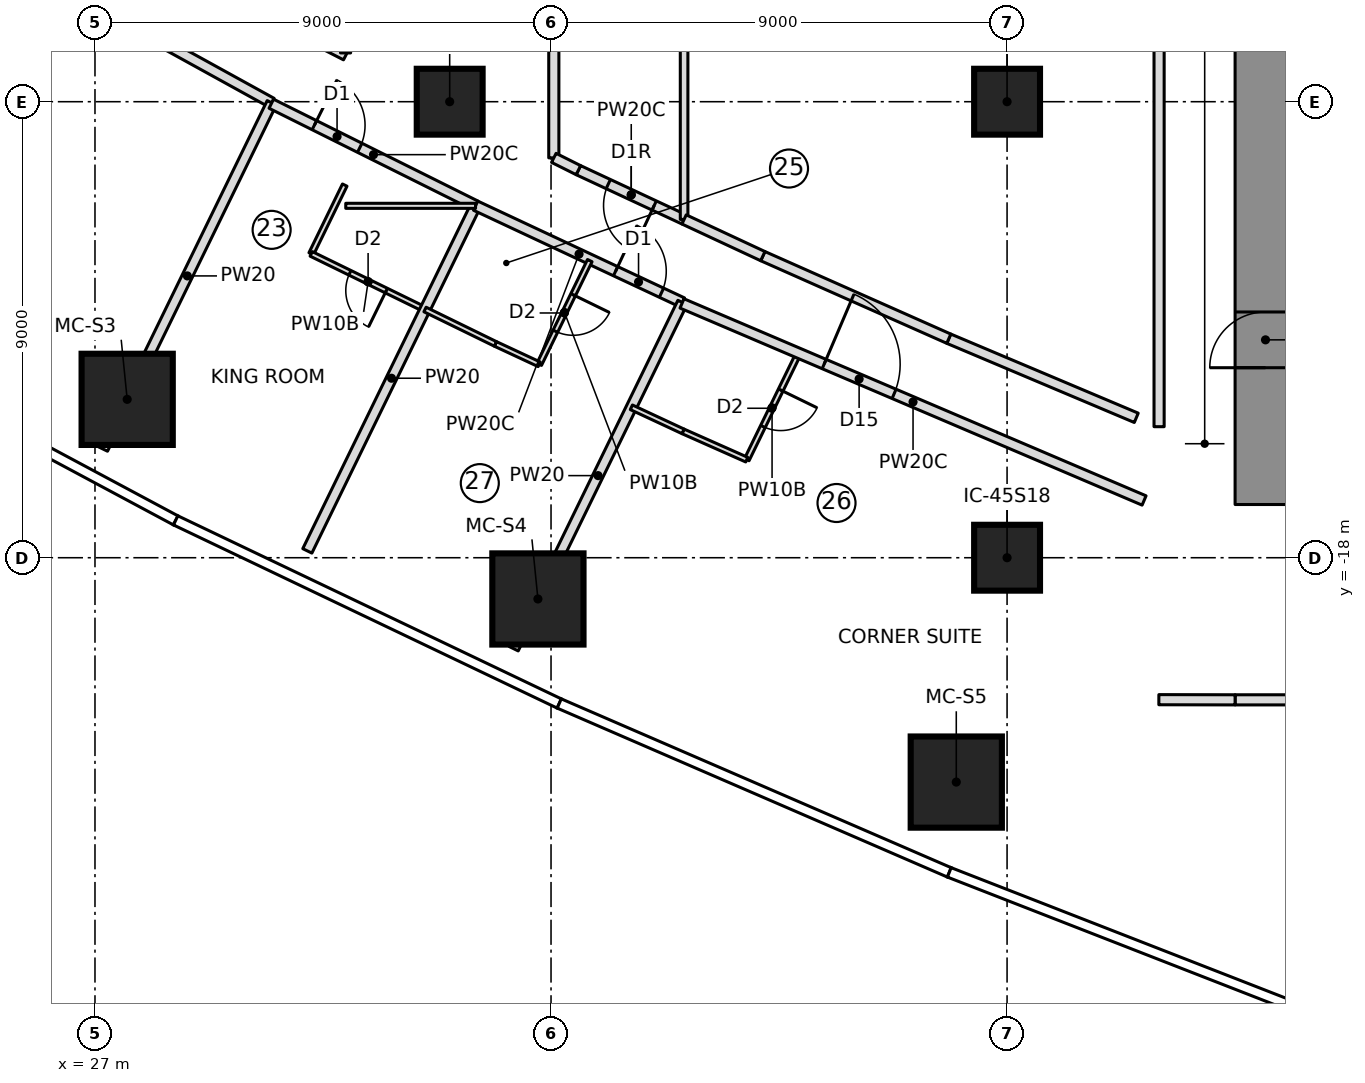
"""IFC4 building model, lengths in metres.
Left out: names, types, materials, properties, quantities, classifications, styles, units other than length and angle.
Written with IfcOpenShell. Run it as: python <this file> out.ifc"""

import sys

from ifc_helpers import new_model, si_unit, direction, frame, frame_2d, origin, origin_2d, place, context, subcontext, project, spatial, rectangle, extrude, element, fill, save


model = new_model("IFC4")
c1 = context("Model", 3, precision=1e-05, world=origin(), true_north=direction((0.0, 1.0)))
c2 = subcontext(c1, "Body", "Model", "MODEL_VIEW")
j1 = project(units=[si_unit("LENGTHUNIT", "METRE"), si_unit("PLANEANGLEUNIT", "RADIAN")], contexts=[c1])
p1 = place(None, origin())
s1 = spatial("IfcSite", under=j1, at=p1, CompositionType="ELEMENT")
p2 = place(p1, origin())
s2 = spatial("IfcBuilding", under=s1, at=p2, CompositionType="ELEMENT")
p3 = place(p2, frame((0.0, 0.0, 39.6)))
s3 = spatial("IfcBuildingStorey", under=s2, at=p3, CompositionType="ELEMENT", Elevation=39.6)
p4 = place(p3, frame((50.1, -16.95, 0.0), z_axis=(0.0, 0.0, 1.0), x_axis=(0.0, 1.0, 0.0)))
e1 = element("IfcWall", 1, at=p4, inside=s3, PredefinedType="SHEAR", context=c2, shape_type="SweptSolid", body=[
    extrude(rectangle(XDim=10.3, YDim=1.2, at=frame_2d((5.15, 0.0))), origin(), (0.0, 0.0, 1.0), 3.55),
])
p5 = place(p4, frame((2.7, 0.0, 0.0)))
e2 = element("IfcOpeningElement", 2, at=p5, cuts=e1, PredefinedType="OPENING", context=c2, shape_type="SweptSolid", body=[
    extrude(rectangle(XDim=1.1, YDim=2.1, at=frame_2d((0.55, 1.05))), frame((0.0, 0.61, 0.0), z_axis=(0.0, -1.0, 0.0), x_axis=(1.0, 0.0, 0.0)), (0.0, 0.0, 1.0), 1.22),
])
for number, where, z_axis, x_axis in (
    (3, (27.635, -14.874, 0.0), (0.0, 0.0, 1.0), (1.0, 0.0, 0.0)),
    (4, (35.741, -18.814, 0.0), (0.0, 0.0, 1.0), (1.0, 0.0, 0.0)),
    (5, (43.998, -22.428, 0.0), (0.0, 0.0, 1.0), (1.0, 0.0, 0.0)),
):
    element("IfcColumn", number, at=place(p3, frame(where, z_axis=z_axis, x_axis=x_axis)), inside=s3, PredefinedType="COLUMN", context=c2, shape_type="SweptSolid", body=[
        extrude(rectangle(XDim=1.8, YDim=1.8, at=origin_2d()), origin(), (0.0, 0.0, 1.0), 3.55),
    ])
for number, where, z_axis, x_axis in (
    (6, (34.0, -9.0, 0.0), (0.0, 0.0, 1.0), (1.0, 0.0, 0.0)),
    (7, (45.0, -18.0, 0.0), (0.0, 0.0, 1.0), (1.0, 0.0, 0.0)),
    (8, (45.0, -9.0, 0.0), (0.0, 0.0, 1.0), (1.0, 0.0, 0.0)),
):
    element("IfcColumn", number, at=place(p3, frame(where, z_axis=z_axis, x_axis=x_axis)), inside=s3, PredefinedType="COLUMN", context=c2, shape_type="SweptSolid", body=[
        extrude(rectangle(XDim=1.3, YDim=1.3, at=origin_2d()), origin(), (0.0, 0.0, 1.0), 3.55),
    ])
p6 = place(p3, frame((17.874, -2.068, 0.0), z_axis=(0.0, 0.0, 1.0), x_axis=(0.875757832755, -0.482750679305, 0.0)))
e9 = element("IfcWall", 9, at=p6, inside=s3, PredefinedType="PARTITIONING", context=c2, shape_type="SweptSolid", body=[
    extrude(rectangle(XDim=14.405, YDim=0.2, at=frame_2d((7.202, 0.0))), origin(), (0.0, 0.0, 1.0), 3.25),
])
p7 = place(p6, frame((3.05, 0.0, 0.0)))
e10 = element("IfcOpeningElement", 10, at=p7, cuts=e9, PredefinedType="OPENING", context=c2, shape_type="SweptSolid", body=[
    extrude(rectangle(XDim=1.5, YDim=2.1, at=frame_2d((0.75, 1.05))), frame((0.0, 0.11, 0.0), z_axis=(0.0, -1.0, 0.0), x_axis=(1.0, 0.0, 0.0)), (0.0, 0.0, 1.0), 0.22),
])
p8 = place(p3, frame((27.157, -15.854, 0.0), z_axis=(0.0, 0.0, 1.0), x_axis=(0.43822365664, 0.898865967072, 0.0)))
e11 = element("IfcWall", 11, at=p8, inside=s3, PredefinedType="PARTITIONING", context=c2, shape_type="SweptSolid", body=[
    extrude(rectangle(XDim=7.601, YDim=0.2, at=frame_2d((3.801, 0.0))), origin(), (0.0, 0.0, 1.0), 3.25),
])
p9 = place(p3, frame((30.48, -9.04, 0.0), z_axis=(0.0, 0.0, 1.0), x_axis=(0.894989913054, -0.446086376761, 0.0)))
e12 = element("IfcWall", 12, at=p9, inside=s3, PredefinedType="PARTITIONING", context=c2, shape_type="SweptSolid", body=[
    extrude(rectangle(XDim=4.506, YDim=0.2, at=frame_2d((2.253, 0.0))), origin(), (0.0, 0.0, 1.0), 3.25),
])
p10 = place(p9, frame((0.95, 0.0, 0.0)))
e13 = element("IfcOpeningElement", 13, at=p10, cuts=e12, PredefinedType="OPENING", context=c2, shape_type="SweptSolid", body=[
    extrude(rectangle(XDim=1.0, YDim=2.1, at=frame_2d((0.5, 1.05))), frame((0.0, 0.11, 0.0), z_axis=(0.0, -1.0, 0.0), x_axis=(1.0, 0.0, 0.0)), (0.0, 0.0, 1.0), 0.22),
])
p11 = place(p3, frame((31.267, -12.003, 0.0), z_axis=(0.0, 0.0, 1.0), x_axis=(0.438136931394, 0.898908243008, 0.0)))
e14 = element("IfcWall", 14, at=p11, inside=s3, PredefinedType="PARTITIONING", context=c2, shape_type="SweptSolid", body=[
    extrude(rectangle(XDim=1.51, YDim=0.1, at=frame_2d((0.755, 0.0))), origin(), (0.0, 0.0, 1.0), 3.25),
])
p12 = place(p3, frame((33.513, -13.101, 0.0), z_axis=(0.0, 0.0, 1.0), x_axis=(-0.89845285455, 0.439070003702, 0.0)))
e15 = element("IfcWall", 15, at=p12, inside=s3, PredefinedType="PARTITIONING", context=c2, shape_type="SweptSolid", body=[
    extrude(rectangle(XDim=2.5, YDim=0.1, at=frame_2d((1.25, 0.0))), origin(), (0.0, 0.0, 1.0), 3.25),
])
p13 = place(p12, frame((0.85, 0.0, 0.0)))
e16 = element("IfcOpeningElement", 16, at=p13, cuts=e15, PredefinedType="OPENING", context=c2, shape_type="SweptSolid", body=[
    extrude(rectangle(XDim=0.8, YDim=2.1, at=frame_2d((0.4, 1.05))), frame((0.0, 0.06, 0.0), z_axis=(0.0, -1.0, 0.0), x_axis=(1.0, 0.0, 0.0)), (0.0, 0.0, 1.0), 0.12),
])
p14 = place(p3, frame((31.191, -17.865, 0.0), z_axis=(0.0, 0.0, 1.0), x_axis=(0.438187612283, 0.898883538865, 0.0)))
e17 = element("IfcWall", 17, at=p14, inside=s3, PredefinedType="PARTITIONING", context=c2, shape_type="SweptSolid", body=[
    extrude(rectangle(XDim=7.582, YDim=0.2, at=frame_2d((3.791, 0.0))), origin(), (0.0, 0.0, 1.0), 3.25),
])
p15 = place(p3, frame((34.512, -11.052, 0.0), z_axis=(0.0, 0.0, 1.0), x_axis=(0.905585758423, -0.424163216394, 0.0)))
e18 = element("IfcWall", 18, at=p15, inside=s3, PredefinedType="PARTITIONING", context=c2, shape_type="SweptSolid", body=[
    extrude(rectangle(XDim=4.507, YDim=0.2, at=frame_2d((2.253, 0.0))), origin(), (0.0, 0.0, 1.0), 3.25),
])
p16 = place(p15, frame((3.05, 0.0, 0.0)))
e19 = element("IfcOpeningElement", 19, at=p16, cuts=e18, PredefinedType="OPENING", context=c2, shape_type="SweptSolid", body=[
    extrude(rectangle(XDim=1.0, YDim=2.1, at=frame_2d((0.5, 1.05))), frame((0.0, 0.11, 0.0), z_axis=(0.0, -1.0, 0.0), x_axis=(1.0, 0.0, 0.0)), (0.0, 0.0, 1.0), 0.22),
])
p17 = place(p3, frame((36.765, -12.136, 0.0), z_axis=(0.0, 0.0, 1.0), x_axis=(-0.438229314017, -0.898863208912, 0.0)))
e20 = element("IfcWall", 20, at=p17, inside=s3, PredefinedType="PARTITIONING", context=c2, shape_type="SweptSolid", body=[
    extrude(rectangle(XDim=2.277, YDim=0.1, at=frame_2d((1.139, 0.0))), origin(), (0.0, 0.0, 1.0), 3.25),
])
p18 = place(p17, frame((0.75, 0.0, 0.0)))
e21 = element("IfcOpeningElement", 21, at=p18, cuts=e20, PredefinedType="OPENING", context=c2, shape_type="SweptSolid", body=[
    extrude(rectangle(XDim=0.8, YDim=2.1, at=frame_2d((0.4, 1.05))), frame((0.0, 0.06, 0.0), z_axis=(0.0, -1.0, 0.0), x_axis=(1.0, 0.0, 0.0)), (0.0, 0.0, 1.0), 0.12),
])
p19 = place(p3, frame((35.767, -14.183, 0.0), z_axis=(0.0, 0.0, 1.0), x_axis=(-0.906477304063, 0.422254540791, 0.0)))
e22 = element("IfcWall", 22, at=p19, inside=s3, PredefinedType="PARTITIONING", context=c2, shape_type="SweptSolid", body=[
    extrude(rectangle(XDim=0.953, YDim=0.1, at=frame_2d((0.477, 0.0))), origin(), (0.0, 0.0, 1.0), 3.25),
])
p20 = place(p3, frame((34.903, -13.781, 0.0), z_axis=(0.0, 0.0, 1.0), x_axis=(-0.898338680123, 0.439303557685, 0.0)))
e23 = element("IfcWall", 23, at=p20, inside=s3, PredefinedType="PARTITIONING", context=c2, shape_type="SweptSolid", body=[
    extrude(rectangle(XDim=1.547, YDim=0.1, at=frame_2d((0.773, 0.0))), origin(), (0.0, 0.0, 1.0), 3.25),
])
p21 = place(p3, frame((35.263, -19.796, 0.0), z_axis=(0.0, 0.0, 1.0), x_axis=(0.438197705697, 0.898878618459, 0.0)))
e24 = element("IfcWall", 24, at=p21, inside=s3, PredefinedType="PARTITIONING", context=c2, shape_type="SweptSolid", body=[
    extrude(rectangle(XDim=7.601, YDim=0.2, at=frame_2d((3.801, 0.0))), origin(), (0.0, 0.0, 1.0), 3.25),
])
p22 = place(p3, frame((40.861, -14.017, 0.0), z_axis=(0.0, 0.0, 1.0), x_axis=(-0.438233629628, -0.898861104878, 0.0)))
e25 = element("IfcWall", 25, at=p22, inside=s3, PredefinedType="PARTITIONING", context=c2, shape_type="SweptSolid", body=[
    extrude(rectangle(XDim=2.279, YDim=0.1, at=frame_2d((1.139, 0.0))), origin(), (0.0, 0.0, 1.0), 3.25),
])
p23 = place(p22, frame((0.75, 0.0, 0.0)))
e26 = element("IfcOpeningElement", 26, at=p23, cuts=e25, PredefinedType="OPENING", context=c2, shape_type="SweptSolid", body=[
    extrude(rectangle(XDim=0.8, YDim=2.1, at=frame_2d((0.4, 1.05))), frame((0.0, 0.06, 0.0), z_axis=(0.0, -1.0, 0.0), x_axis=(1.0, 0.0, 0.0)), (0.0, 0.0, 1.0), 0.12),
])
p24 = place(p3, frame((39.863, -16.065, 0.0), z_axis=(0.0, 0.0, 1.0), x_axis=(-0.913972512123, 0.405776104625, 0.0)))
e27 = element("IfcWall", 27, at=p24, inside=s3, PredefinedType="PARTITIONING", context=c2, shape_type="SweptSolid", body=[
    extrude(rectangle(XDim=1.375, YDim=0.1, at=frame_2d((0.688, 0.0))), origin(), (0.0, 0.0, 1.0), 3.25),
])
p25 = place(p3, frame((38.606, -15.507, 0.0), z_axis=(0.0, 0.0, 1.0), x_axis=(-0.90632717857, 0.422576673972, 0.0)))
e28 = element("IfcWall", 28, at=p25, inside=s3, PredefinedType="PARTITIONING", context=c2, shape_type="SweptSolid", body=[
    extrude(rectangle(XDim=1.125, YDim=0.1, at=frame_2d((0.563, 0.0))), origin(), (0.0, 0.0, 1.0), 3.25),
])
p26 = place(p3, frame((31.95, -8.085, 0.0), z_axis=(0.0, 0.0, 1.0), x_axis=(-0.890213377055, 0.455543788579, 0.0)))
e29 = element("IfcWall", 29, at=p26, inside=s3, PredefinedType="PARTITIONING", context=c2, shape_type="SweptSolid", body=[
    extrude(rectangle(XDim=2.912, YDim=0.2, at=frame_2d((1.456, 0.0))), origin(), (0.0, 0.0, 1.0), 3.25),
])
p27 = place(p3, frame((38.626, -11.323, 0.0), z_axis=(0.0, 0.0, 1.0), x_axis=(-0.906372737018, 0.422478948103, 0.0)))
e30 = element("IfcWall", 30, at=p27, inside=s3, PredefinedType="PARTITIONING", context=c2, shape_type="SweptSolid", body=[
    extrude(rectangle(XDim=2.302, YDim=0.2, at=frame_2d((1.151, 0.0))), origin(), (0.0, 0.0, 1.0), 3.25),
])
p28 = place(p27, frame((0.651, 0.0, 0.0)))
e31 = element("IfcOpeningElement", 31, at=p28, cuts=e30, PredefinedType="OPENING", context=c2, shape_type="SweptSolid", body=[
    extrude(rectangle(XDim=1.0, YDim=2.1, at=frame_2d((0.5, 1.05))), frame((0.0, 0.11, 0.0), z_axis=(0.0, -1.0, 0.0), x_axis=(1.0, 0.0, 0.0)), (0.0, 0.0, 1.0), 0.22),
])
p29 = place(p3, frame((38.626, -11.323, 0.0), z_axis=(0.0, 0.0, 1.0), x_axis=(0.0, 1.0, 0.0)))
e32 = element("IfcWall", 32, at=p29, inside=s3, PredefinedType="PARTITIONING", context=c2, shape_type="SweptSolid", body=[
    extrude(rectangle(XDim=22.647, YDim=0.15, at=frame_2d((11.323, 0.0))), origin(), (0.0, 0.0, 1.0), 3.25),
])
p30 = place(p3, frame((47.55, -15.239, 0.0), z_axis=(0.0, 0.0, 1.0), x_axis=(-0.921269894054, 0.388923877269, 0.0)))
e33 = element("IfcWall", 33, at=p30, inside=s3, PredefinedType="PARTITIONING", context=c2, shape_type="SweptSolid", body=[
    extrude(rectangle(XDim=4.016, YDim=0.2, at=frame_2d((2.008, 0.0))), origin(), (0.0, 0.0, 1.0), 3.25),
])
p31 = place(p3, frame((43.85, -13.677, 0.0), z_axis=(0.0, 0.0, 1.0), x_axis=(-0.913986953061, 0.405743576209, 0.0)))
e34 = element("IfcWall", 34, at=p31, inside=s3, PredefinedType="PARTITIONING", context=c2, shape_type="SweptSolid", body=[
    extrude(rectangle(XDim=4.016, YDim=0.2, at=frame_2d((2.008, 0.0))), origin(), (0.0, 0.0, 1.0), 3.25),
])
p32 = place(p3, frame((40.18, -12.048, 0.0), z_axis=(0.0, 0.0, 1.0), x_axis=(-0.906314095157, 0.422604733668, 0.0)))
e35 = element("IfcWall", 35, at=p32, inside=s3, PredefinedType="PARTITIONING", context=c2, shape_type="SweptSolid", body=[
    extrude(rectangle(XDim=1.714, YDim=0.2, at=frame_2d((0.857, 0.0))), origin(), (0.0, 0.0, 1.0), 3.25),
])
p33 = place(p3, frame((49.5, -20.805, 0.0), z_axis=(0.0, 0.0, 1.0), x_axis=(1.0, 0.0, 0.0)))
e36 = element("IfcWall", 36, at=p33, inside=s3, PredefinedType="PARTITIONING", context=c2, shape_type="SweptSolid", body=[
    extrude(rectangle(XDim=5.097, YDim=0.2, at=frame_2d((2.548, 0.0))), origin(), (0.0, 0.0, 1.0), 3.25),
])
p34 = place(p33, frame((2.048, 0.0, 0.0)))
e37 = element("IfcOpeningElement", 37, at=p34, cuts=e36, PredefinedType="OPENING", context=c2, shape_type="SweptSolid", body=[
    extrude(rectangle(XDim=1.5, YDim=2.1, at=frame_2d((0.75, 1.05))), frame((0.0, 0.11, 0.0), z_axis=(0.0, -1.0, 0.0), x_axis=(1.0, 0.0, 0.0)), (0.0, 0.0, 1.0), 0.22),
])
p35 = place(p3, frame((31.949, -11.055, 0.0), z_axis=(0.0, 0.0, 1.0), x_axis=(1.0, 0.0, 0.0)))
e38 = element("IfcWall", 38, at=p35, inside=s3, PredefinedType="PARTITIONING", context=c2, shape_type="SweptSolid", body=[
    extrude(rectangle(XDim=2.562, YDim=0.1, at=frame_2d((1.281, 0.0))), origin(), (0.0, 0.0, 1.0), 3.25),
])
p36 = place(p3, frame((38.585, -12.981, 0.0), z_axis=(0.0, 0.0, 1.0), x_axis=(0.919847962482, -0.392275064103, 0.0)))
e39 = element("IfcWall", 39, at=p36, inside=s3, PredefinedType="PARTITIONING", context=c2, shape_type="SweptSolid", body=[
    extrude(rectangle(XDim=9.914, YDim=0.2, at=frame_2d((4.957, 0.0))), origin(), (0.0, 0.0, 1.0), 3.25),
])
p37 = place(p36, frame((3.05, 0.0, 0.0)))
e40 = element("IfcOpeningElement", 40, at=p37, cuts=e39, PredefinedType="OPENING", context=c2, shape_type="SweptSolid", body=[
    extrude(rectangle(XDim=1.5, YDim=2.1, at=frame_2d((0.75, 1.05))), frame((0.0, 0.11, 0.0), z_axis=(0.0, -1.0, 0.0), x_axis=(1.0, 0.0, 0.0)), (0.0, 0.0, 1.0), 0.22),
])
p38 = place(p3, frame((31.948, -6.985, 0.0), z_axis=(0.0, 0.0, 1.0), x_axis=(-0.003248242724, -0.999994724446, 0.0)))
e41 = element("IfcWall", 41, at=p38, inside=s3, PredefinedType="PARTITIONING", context=c2, shape_type="SweptSolid", body=[
    extrude(rectangle(XDim=1.052, YDim=0.2, at=frame_2d((0.526, 0.0))), origin(), (0.0, 0.0, 1.0), 3.25),
])
p39 = place(p3, frame((36.055, -10.108, 0.0), z_axis=(0.0, 0.0, 1.0), x_axis=(0.0, 1.0, 0.0)))
e42 = element("IfcWall", 42, at=p39, inside=s3, PredefinedType="PARTITIONING", context=c2, shape_type="SweptSolid", body=[
    extrude(rectangle(XDim=3.159, YDim=0.2, at=frame_2d((1.58, 0.0))), origin(), (0.0, 0.0, 1.0), 3.25),
])
p40 = place(p3, frame((48.0, 15.414, 0.0), z_axis=(0.0, 0.0, 1.0), x_axis=(0.0, -1.0, 0.0)))
e43 = element("IfcWall", 43, at=p40, inside=s3, PredefinedType="PARTITIONING", context=c2, shape_type="SweptSolid", body=[
    extrude(rectangle(XDim=30.828, YDim=0.2, at=frame_2d((15.414, 0.0))), origin(), (0.0, 0.0, 1.0), 3.25),
])
p41 = place(p3, frame((47.995, -20.802, 0.0), z_axis=(0.0, 0.0, 1.0), x_axis=(0.999998104399, -0.001947099992, 0.0)))
e44 = element("IfcWall", 44, at=p41, inside=s3, PredefinedType="PARTITIONING", context=c2, shape_type="SweptSolid", body=[
    extrude(rectangle(XDim=1.505, YDim=0.2, at=frame_2d((0.752, 0.0))), origin(), (0.0, 0.0, 1.0), 3.25),
])
p42 = place(p3, frame((36.54, -10.351, 0.0), z_axis=(0.0, 0.0, 1.0), x_axis=(-0.894337154042, 0.447393624116, 0.0)))
e45 = element("IfcWall", 45, at=p42, inside=s3, PredefinedType="PARTITIONING", context=c2, shape_type="SweptSolid", body=[
    extrude(rectangle(XDim=0.542, YDim=0.2, at=frame_2d((0.271, 0.0))), origin(), (0.0, 0.0, 1.0), 3.25),
])
p43 = place(p13, origin())
e46 = element("IfcDoor", 46, at=p43, inside=s3, OperationType="SINGLE_SWING_LEFT", PredefinedType="DOOR", context=c2, shape_type="SweptSolid", body=[
    extrude(rectangle(XDim=0.8, YDim=2.1, at=frame_2d((0.4, 1.05))), frame((0.0, 0.025, 0.0), z_axis=(0.0, -1.0, 0.0), x_axis=(1.0, 0.0, 0.0)), (0.0, 0.0, 1.0), 0.05),
])
fill(e16, e46)
p44 = place(p10, origin())
e47 = element("IfcDoor", 47, at=p44, inside=s3, OperationType="SINGLE_SWING_LEFT", PredefinedType="DOOR", context=c2, shape_type="SweptSolid", body=[
    extrude(rectangle(XDim=1.0, YDim=2.1, at=frame_2d((0.5, 1.05))), frame((0.0, 0.025, 0.0), z_axis=(0.0, -1.0, 0.0), x_axis=(1.0, 0.0, 0.0)), (0.0, 0.0, 1.0), 0.05),
])
fill(e13, e47)
p45 = place(p18, origin())
e48 = element("IfcDoor", 48, at=p45, inside=s3, OperationType="SINGLE_SWING_LEFT", PredefinedType="DOOR", context=c2, shape_type="SweptSolid", body=[
    extrude(rectangle(XDim=0.8, YDim=2.1, at=frame_2d((0.4, 1.05))), frame((0.0, 0.025, 0.0), z_axis=(0.0, -1.0, 0.0), x_axis=(1.0, 0.0, 0.0)), (0.0, 0.0, 1.0), 0.05),
])
fill(e21, e48)
p46 = place(p16, origin())
e49 = element("IfcDoor", 49, at=p46, inside=s3, OperationType="SINGLE_SWING_LEFT", PredefinedType="DOOR", context=c2, shape_type="SweptSolid", body=[
    extrude(rectangle(XDim=1.0, YDim=2.1, at=frame_2d((0.5, 1.05))), frame((0.0, 0.025, 0.0), z_axis=(0.0, -1.0, 0.0), x_axis=(1.0, 0.0, 0.0)), (0.0, 0.0, 1.0), 0.05),
])
fill(e19, e49)
p47 = place(p23, origin())
e50 = element("IfcDoor", 50, at=p47, inside=s3, OperationType="SINGLE_SWING_LEFT", PredefinedType="DOOR", context=c2, shape_type="SweptSolid", body=[
    extrude(rectangle(XDim=0.8, YDim=2.1, at=frame_2d((0.4, 1.05))), frame((0.0, 0.025, 0.0), z_axis=(0.0, -1.0, 0.0), x_axis=(1.0, 0.0, 0.0)), (0.0, 0.0, 1.0), 0.05),
])
fill(e26, e50)
p48 = place(p37, origin())
e51 = element("IfcDoor", 51, at=p48, inside=s3, OperationType="DOUBLE_DOOR_SINGLE_SWING", PredefinedType="DOOR", context=c2, shape_type="SweptSolid", body=[
    extrude(rectangle(XDim=1.5, YDim=2.1, at=frame_2d((0.75, 1.05))), frame((0.0, 0.025, 0.0), z_axis=(0.0, -1.0, 0.0), x_axis=(1.0, 0.0, 0.0)), (0.0, 0.0, 1.0), 0.05),
])
fill(e40, e51)
p49 = place(p28, origin())
e52 = element("IfcDoor", 52, at=p49, inside=s3, OperationType="SINGLE_SWING_RIGHT", PredefinedType="DOOR", context=c2, shape_type="SweptSolid", body=[
    extrude(rectangle(XDim=1.0, YDim=2.1, at=frame_2d((0.5, 1.05))), frame((0.0, 0.025, 0.0), z_axis=(0.0, -1.0, 0.0), x_axis=(1.0, 0.0, 0.0)), (0.0, 0.0, 1.0), 0.05),
])
fill(e31, e52)
p50 = place(p5, origin())
e53 = element("IfcDoor", 53, at=p50, inside=s3, OperationType="SINGLE_SWING_RIGHT", PredefinedType="DOOR", context=c2, shape_type="SweptSolid", body=[
    extrude(rectangle(XDim=1.1, YDim=2.1, at=frame_2d((0.55, 1.05))), frame((0.0, 0.025, 0.0), z_axis=(0.0, -1.0, 0.0), x_axis=(1.0, 0.0, 0.0)), (0.0, 0.0, 1.0), 0.05),
])
fill(e2, e53)
save(model, sys.argv[1])
